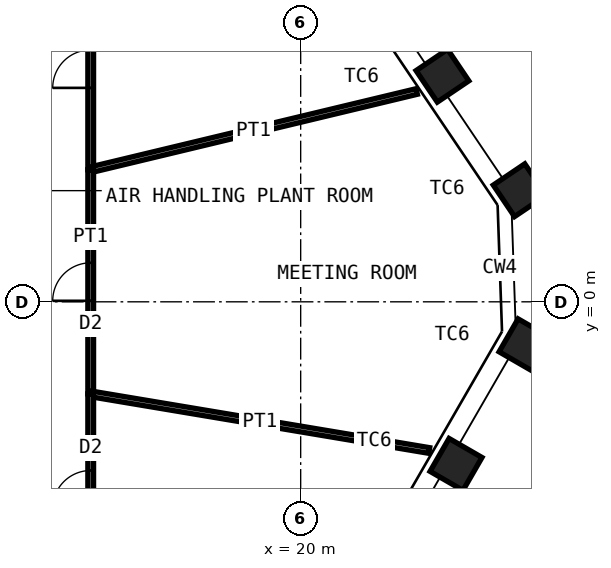
"""IFC4 building model, lengths in metres.
Left out: names, types, materials, properties, quantities, classifications, styles, units other than length and angle.
Written with IfcOpenShell. Run it as: python <this file> out.ifc"""

import sys

from ifc_helpers import new_model, si_unit, direction, frame, frame_2d, origin, origin_2d, place, context, subcontext, project, spatial, rectangle, hollow_rectangle, extrude, element, fill, save


model = new_model("IFC4")
c1 = context("Model", 3, precision=1e-05, world=origin(), true_north=direction((0.0, 1.0)))
c2 = subcontext(c1, "Body", "Model", "MODEL_VIEW")
j1 = project(units=[si_unit("LENGTHUNIT", "METRE"), si_unit("PLANEANGLEUNIT", "RADIAN")], contexts=[c1])
p1 = place(None, origin())
s1 = spatial("IfcSite", under=j1, at=p1, CompositionType="ELEMENT")
p2 = place(p1, origin())
s2 = spatial("IfcBuilding", under=s1, at=p2, CompositionType="ELEMENT")
p3 = place(p2, frame((0.0, 0.0, 235.0)))
s3 = spatial("IfcBuildingStorey", under=s2, at=p3, CompositionType="ELEMENT", Elevation=235.0)
for number, where, z_axis, x_axis in (
    (1, (23.731, 5.948, 0.0), (0.0, 0.0, 1.0), (-0.559, 0.829, 0.0)),
    (2, (25.762, 2.936, 0.0), (0.0, 0.0, 1.0), (-0.559, 0.829, 0.0)),
    (3, (25.905, -1.132, 0.0), (0.0, 0.0, 1.0), (0.5, 0.866, 0.0)),
    (4, (24.088, -4.279, 0.0), (0.0, 0.0, 1.0), (0.5, 0.866, 0.0)),
):
    element("IfcColumn", number, at=place(p3, frame(where, z_axis=z_axis, x_axis=x_axis)), inside=s3, PredefinedType="COLUMN", context=c2, shape_type="SweptSolid", body=[
        extrude(hollow_rectangle(XDim=1.0, YDim=1.0, WallThickness=0.06, at=origin_2d()), origin(), (0.0, 0.0, 1.0), 4.2),
    ])
p4 = place(p3, frame((14.475, 8.783, 0.0), z_axis=(0.0, 0.0, 1.0), x_axis=(0.0, -1.0, 0.0)))
e5 = element("IfcWall", 5, at=p4, inside=s3, PredefinedType="PARTITIONING", context=c2, shape_type="SweptSolid", body=[
    extrude(rectangle(XDim=5.309, YDim=0.15, at=frame_2d((2.654, 0.0))), origin(), (0.0, 0.0, 1.0), 4.03),
])
p5 = place(p4, frame((2.154, 0.0, 0.0)))
e6 = element("IfcOpeningElement", 6, at=p5, cuts=e5, PredefinedType="OPENING", context=c2, shape_type="SweptSolid", body=[
    extrude(rectangle(XDim=1.0, YDim=2.4, at=frame_2d((0.5, 1.2))), frame((0.0, 0.085, 0.0), z_axis=(0.0, -1.0, 0.0), x_axis=(1.0, 0.0, 0.0)), (0.0, 0.0, 1.0), 0.17),
])
p6 = place(p3, frame((23.053, 5.534, 0.0), z_axis=(0.0, 0.0, 1.0), x_axis=(-0.972377252501, -0.233414821335, 0.0)))
e7 = element("IfcWall", 7, at=p6, inside=s3, PredefinedType="PARTITIONING", context=c2, shape_type="SweptSolid", body=[
    extrude(rectangle(XDim=8.822, YDim=0.15, at=frame_2d((4.411, 0.0))), origin(), (0.0, 0.0, 1.0), 3.43),
])
p7 = place(p3, frame((14.475, 3.475, 0.0), z_axis=(0.0, 0.0, 1.0), x_axis=(0.0, -1.0, 0.0)))
e8 = element("IfcWall", 8, at=p7, inside=s3, PredefinedType="PARTITIONING", context=c2, shape_type="SweptSolid", body=[
    extrude(rectangle(XDim=5.896, YDim=0.15, at=frame_2d((2.948, 0.0))), origin(), (0.0, 0.0, 1.0), 4.03),
])
p8 = place(p7, frame((2.448, 0.0, 0.0)))
e9 = element("IfcOpeningElement", 9, at=p8, cuts=e8, PredefinedType="OPENING", context=c2, shape_type="SweptSolid", body=[
    extrude(rectangle(XDim=1.0, YDim=2.4, at=frame_2d((0.5, 1.2))), frame((0.0, 0.085, 0.0), z_axis=(0.0, -1.0, 0.0), x_axis=(1.0, 0.0, 0.0)), (0.0, 0.0, 1.0), 0.17),
])
p9 = place(p3, frame((23.383, -3.912, 0.0), z_axis=(0.0, 0.0, 1.0), x_axis=(-0.986293651891, 0.164999491631, 0.0)))
e10 = element("IfcWall", 10, at=p9, inside=s3, PredefinedType="PARTITIONING", context=c2, shape_type="SweptSolid", body=[
    extrude(rectangle(XDim=9.032, YDim=0.15, at=frame_2d((4.516, 0.0))), origin(), (0.0, 0.0, 1.0), 3.43),
])
p10 = place(p3, frame((14.475, -2.422, 0.0), z_axis=(0.0, 0.0, 1.0), x_axis=(0.0, -1.0, 0.0)))
e11 = element("IfcWall", 11, at=p10, inside=s3, PredefinedType="PARTITIONING", context=c2, shape_type="SweptSolid", body=[
    extrude(rectangle(XDim=5.033, YDim=0.15, at=frame_2d((2.517, 0.0))), origin(), (0.0, 0.0, 1.0), 4.03),
])
p11 = place(p10, frame((2.017, 0.0, 0.0)))
e12 = element("IfcOpeningElement", 12, at=p11, cuts=e11, PredefinedType="OPENING", context=c2, shape_type="SweptSolid", body=[
    extrude(rectangle(XDim=1.0, YDim=2.4, at=frame_2d((0.5, 1.2))), frame((0.0, 0.085, 0.0), z_axis=(0.0, -1.0, 0.0), x_axis=(1.0, 0.0, 0.0)), (0.0, 0.0, 1.0), 0.17),
])
p12 = place(p5, origin())
e13 = element("IfcDoor", 13, at=p12, inside=s3, OperationType="SINGLE_SWING_RIGHT", PredefinedType="DOOR", context=c2, shape_type="SweptSolid", body=[
    extrude(rectangle(XDim=1.0, YDim=2.4, at=frame_2d((0.5, 1.2))), frame((0.0, 0.025, 0.0), z_axis=(0.0, -1.0, 0.0), x_axis=(1.0, 0.0, 0.0)), (0.0, 0.0, 1.0), 0.05),
])
fill(e6, e13)
p13 = place(p8, origin())
e14 = element("IfcDoor", 14, at=p13, inside=s3, OperationType="SINGLE_SWING_RIGHT", PredefinedType="DOOR", context=c2, shape_type="SweptSolid", body=[
    extrude(rectangle(XDim=1.0, YDim=2.4, at=frame_2d((0.5, 1.2))), frame((0.0, 0.025, 0.0), z_axis=(0.0, -1.0, 0.0), x_axis=(1.0, 0.0, 0.0)), (0.0, 0.0, 1.0), 0.05),
])
fill(e9, e14)
p14 = place(p11, origin())
e15 = element("IfcDoor", 15, at=p14, inside=s3, OperationType="SINGLE_SWING_RIGHT", PredefinedType="DOOR", context=c2, shape_type="SweptSolid", body=[
    extrude(rectangle(XDim=1.0, YDim=2.4, at=frame_2d((0.5, 1.2))), frame((0.0, 0.025, 0.0), z_axis=(0.0, -1.0, 0.0), x_axis=(1.0, 0.0, 0.0)), (0.0, 0.0, 1.0), 0.05),
])
fill(e12, e15)
save(model, sys.argv[1])
